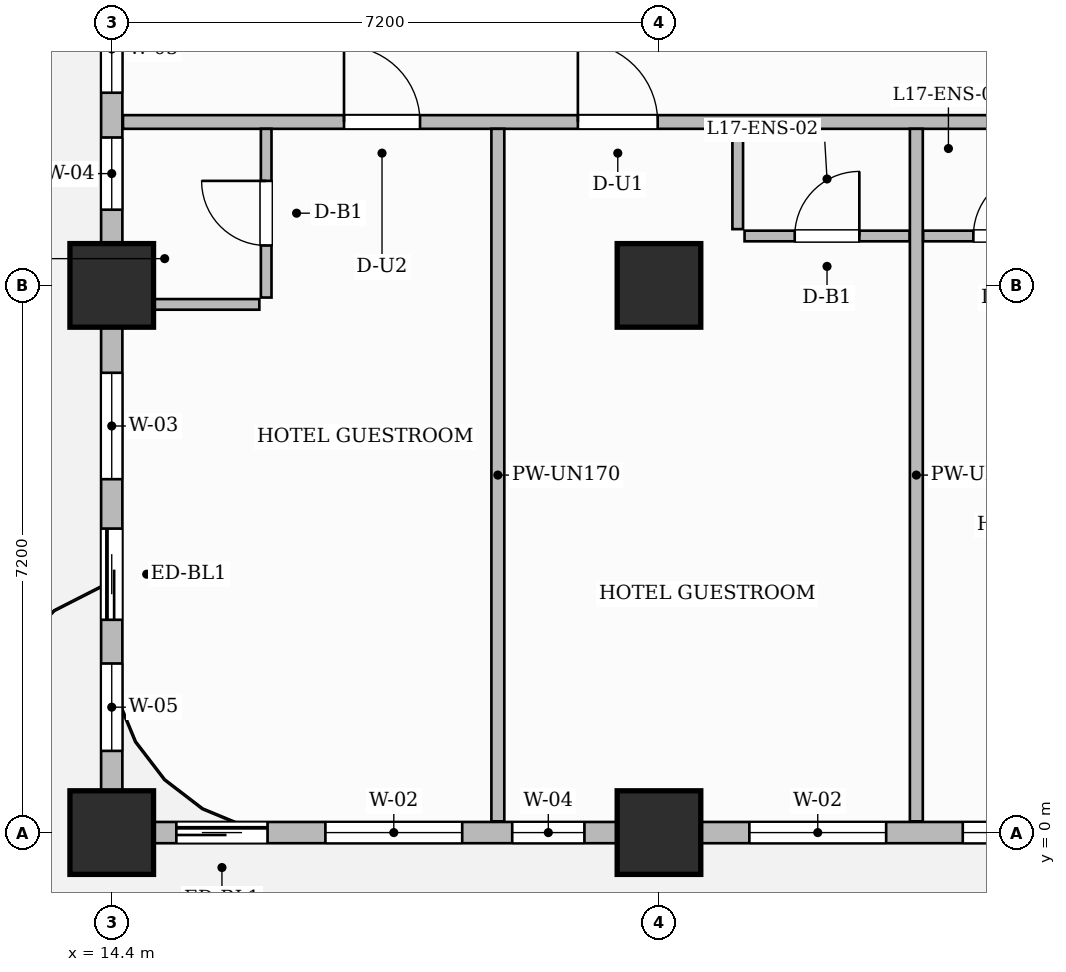
"""IFC4 building model, lengths in metres.
Left out: names, types, materials, properties, quantities, classifications, styles, units other than length and angle.
Written with IfcOpenShell. Run it as: python <this file> out.ifc"""

import sys

from ifc_helpers import new_model, si_unit, direction, frame, frame_2d, origin, origin_2d, place, context, subcontext, project, spatial, rectangle, extrude, source, transform, mapped, element, fill, save


model = new_model("IFC4")
c1 = context("Model", 3, precision=1e-05, world=origin(), true_north=direction((0.0, 1.0)))
c2 = subcontext(c1, "Body", "Model", "MODEL_VIEW")
j1 = project(units=[si_unit("LENGTHUNIT", "METRE"), si_unit("PLANEANGLEUNIT", "RADIAN")], contexts=[c1])
p1 = place(None, origin())
s1 = spatial("IfcSite", under=j1, at=p1, CompositionType="ELEMENT")
p2 = place(p1, origin())
s2 = spatial("IfcBuilding", under=s1, at=p2, CompositionType="ELEMENT")
p3 = place(p2, frame((0.0, 0.0, 73.1)))
s3 = spatial("IfcBuildingStorey", under=s2, at=p3, CompositionType="ELEMENT", Elevation=73.1)
m1 = source(origin(), c2, "Body", "SweptSolid", [
    extrude(rectangle(XDim=1.1, YDim=1.1, at=origin_2d()), origin(), (0.0, 0.0, 1.0), 3.7),
])
for number, where, z_axis, x_axis in (
    (1, (14.4, 0.0, 0.0), (0.0, 0.0, 1.0), (1.0, 0.0, 0.0)),
    (2, (14.4, 7.2, 0.0), (0.0, 0.0, 1.0), (1.0, 0.0, 0.0)),
    (3, (21.6, 0.0, 0.0), (0.0, 0.0, 1.0), (1.0, 0.0, 0.0)),
    (4, (21.6, 7.2, 0.0), (0.0, 0.0, 1.0), (1.0, 0.0, 0.0)),
):
    element("IfcColumn", number, at=place(p3, frame(where, z_axis=z_axis, x_axis=x_axis)), inside=s3, PredefinedType="COLUMN", context=c2, shape_type="MappedRepresentation", body=[
        mapped(m1, transform((0.0, 0.0, 0.0), scale=1.0)),
    ])
p4 = place(p3, frame((14.548, 9.35, 0.0), z_axis=(0.0, 0.0, 1.0), x_axis=(1.0, 0.0, 0.0)))
e5 = element("IfcWall", 5, at=p4, inside=s3, PredefinedType="PARTITIONING", context=c2, shape_type="SweptSolid", body=[
    extrude(rectangle(XDim=15.562, YDim=0.18, at=frame_2d((7.781, 0.0))), origin(), (0.0, 0.0, 1.0), 3.45),
])
p5 = place(p4, frame((2.908, 0.0, 0.0)))
e6 = element("IfcOpeningElement", 6, at=p5, cuts=e5, PredefinedType="OPENING", context=c2, shape_type="SweptSolid", body=[
    extrude(rectangle(XDim=1.0, YDim=2.2, at=frame_2d((0.5, 1.1))), frame((0.0, 0.1, 0.0), z_axis=(0.0, -1.0, 0.0), x_axis=(1.0, 0.0, 0.0)), (0.0, 0.0, 1.0), 0.2),
])
p6 = place(p4, frame((5.985, 0.0, 0.0)))
e7 = element("IfcOpeningElement", 7, at=p6, cuts=e5, PredefinedType="OPENING", context=c2, shape_type="SweptSolid", body=[
    extrude(rectangle(XDim=1.05, YDim=2.25, at=frame_2d((0.525, 1.125))), frame((0.0, 0.1, 0.0), z_axis=(0.0, -1.0, 0.0), x_axis=(1.0, 0.0, 0.0)), (0.0, 0.0, 1.0), 0.2),
])
p7 = place(p4, frame((13.72, 0.0, 0.0)))
e8 = element("IfcOpeningElement", 8, at=p7, cuts=e5, PredefinedType="OPENING", context=c2, shape_type="SweptSolid", body=[
    extrude(rectangle(XDim=1.0, YDim=2.2, at=frame_2d((0.5, 1.1))), frame((0.0, 0.1, 0.0), z_axis=(0.0, -1.0, 0.0), x_axis=(1.0, 0.0, 0.0)), (0.0, 0.0, 1.0), 0.2),
])
p8 = place(p3, frame((19.48, 0.148, 0.0), z_axis=(0.0, 0.0, 1.0), x_axis=(0.0, 1.0, 0.0)))
e9 = element("IfcWall", 9, at=p8, inside=s3, PredefinedType="PARTITIONING", context=c2, shape_type="SweptSolid", body=[
    extrude(rectangle(XDim=9.112, YDim=0.17, at=frame_2d((4.556, 0.0))), origin(), (0.0, 0.0, 1.0), 3.45),
])
p9 = place(p3, frame((24.986, 0.148, 0.0), z_axis=(0.0, 0.0, 1.0), x_axis=(0.0, 1.0, 0.0)))
e10 = element("IfcWall", 10, at=p9, inside=s3, PredefinedType="PARTITIONING", context=c2, shape_type="SweptSolid", body=[
    extrude(rectangle(XDim=9.112, YDim=0.17, at=frame_2d((4.556, 0.0))), origin(), (0.0, 0.0, 1.0), 3.075),
])
p10 = place(p3, frame((16.432, 7.04, 0.0), z_axis=(0.0, 0.0, 1.0), x_axis=(0.0, 1.0, 0.0)))
e11 = element("IfcWall", 11, at=p10, inside=s3, PredefinedType="PARTITIONING", context=c2, shape_type="SweptSolid", body=[
    extrude(rectangle(XDim=2.22, YDim=0.14, at=frame_2d((1.11, 0.0))), origin(), (0.0, 0.0, 1.0), 3.45),
])
p11 = place(p10, frame((0.685, 0.0, 0.0)))
e12 = element("IfcOpeningElement", 12, at=p11, cuts=e11, PredefinedType="OPENING", context=c2, shape_type="SweptSolid", body=[
    extrude(rectangle(XDim=0.85, YDim=2.1, at=frame_2d((0.425, 1.05))), frame((0.0, 0.08, 0.0), z_axis=(0.0, -1.0, 0.0), x_axis=(1.0, 0.0, 0.0)), (0.0, 0.0, 1.0), 0.16),
])
p12 = place(p3, frame((14.49, 6.95, 0.0), z_axis=(0.0, 0.0, 1.0), x_axis=(1.0, 0.0, 0.0)))
e13 = element("IfcWall", 13, at=p12, inside=s3, PredefinedType="PARTITIONING", context=c2, shape_type="SweptSolid", body=[
    extrude(rectangle(XDim=1.852, YDim=0.14, at=frame_2d((0.926, 0.0))), origin(), (0.0, 0.0, 1.0), 2.885),
])
p13 = place(p3, frame((22.636, 7.94, 0.0), z_axis=(0.0, 0.0, 1.0), x_axis=(0.0, 1.0, 0.0)))
e14 = element("IfcWall", 14, at=p13, inside=s3, PredefinedType="PARTITIONING", context=c2, shape_type="SweptSolid", body=[
    extrude(rectangle(XDim=1.32, YDim=0.14, at=frame_2d((0.66, 0.0))), origin(), (0.0, 0.0, 1.0), 3.45),
])
p14 = place(p3, frame((22.726, 7.85, 0.0), z_axis=(0.0, 0.0, 1.0), x_axis=(1.0, 0.0, 0.0)))
e15 = element("IfcWall", 15, at=p14, inside=s3, PredefinedType="PARTITIONING", context=c2, shape_type="SweptSolid", body=[
    extrude(rectangle(XDim=2.17, YDim=0.14, at=frame_2d((1.085, 0.0))), origin(), (0.0, 0.0, 1.0), 3.45),
])
p15 = place(p14, frame((0.66, 0.0, 0.0)))
e16 = element("IfcOpeningElement", 16, at=p15, cuts=e15, PredefinedType="OPENING", context=c2, shape_type="SweptSolid", body=[
    extrude(rectangle(XDim=0.85, YDim=2.1, at=frame_2d((0.425, 1.05))), frame((0.0, 0.08, 0.0), z_axis=(0.0, -1.0, 0.0), x_axis=(1.0, 0.0, 0.0)), (0.0, 0.0, 1.0), 0.16),
])
p16 = place(p3, frame((25.076, 7.85, 0.0), z_axis=(0.0, 0.0, 1.0), x_axis=(1.0, 0.0, 0.0)))
e17 = element("IfcWall", 17, at=p16, inside=s3, PredefinedType="PARTITIONING", context=c2, shape_type="SweptSolid", body=[
    extrude(rectangle(XDim=2.17, YDim=0.14, at=frame_2d((1.085, 0.0))), origin(), (0.0, 0.0, 1.0), 3.45),
])
p17 = place(p16, frame((0.66, 0.0, 0.0)))
e18 = element("IfcOpeningElement", 18, at=p17, cuts=e17, PredefinedType="OPENING", context=c2, shape_type="SweptSolid", body=[
    extrude(rectangle(XDim=0.85, YDim=2.1, at=frame_2d((0.425, 1.05))), frame((0.0, 0.08, 0.0), z_axis=(0.0, -1.0, 0.0), x_axis=(1.0, 0.0, 0.0)), (0.0, 0.0, 1.0), 0.16),
])
p18 = place(p3, frame((14.4, 0.0, 0.0), z_axis=(0.0, 0.0, 1.0), x_axis=(1.0, 0.0, 0.0)))
e19 = element("IfcWall", 19, at=p18, inside=s3, PredefinedType="SOLIDWALL", context=c2, shape_type="SweptSolid", body=[
    extrude(rectangle(XDim=43.2, YDim=0.28, at=frame_2d((21.6, 0.0))), origin(), (0.0, 0.0, 1.0), 2.885),
])
p19 = place(p18, frame((0.85, 0.0, 0.0)))
e20 = element("IfcOpeningElement", 20, at=p19, cuts=e19, PredefinedType="OPENING", context=c2, shape_type="SweptSolid", body=[
    extrude(rectangle(XDim=1.2, YDim=2.2, at=frame_2d((0.6, 1.1))), frame((0.0, 0.15, 0.0), z_axis=(0.0, -1.0, 0.0), x_axis=(1.0, 0.0, 0.0)), (0.0, 0.0, 1.0), 0.3),
])
p20 = place(p18, frame((2.811, 0.0, 0.8)))
e21 = element("IfcOpeningElement", 21, at=p20, cuts=e19, PredefinedType="OPENING", context=c2, shape_type="SweptSolid", body=[
    extrude(rectangle(XDim=1.8, YDim=1.85, at=frame_2d((0.9, 0.925))), frame((0.0, 0.15, 0.0), z_axis=(0.0, -1.0, 0.0), x_axis=(1.0, 0.0, 0.0)), (0.0, 0.0, 1.0), 0.3),
])
p21 = place(p18, frame((5.269, 0.0, 0.8)))
e22 = element("IfcOpeningElement", 22, at=p21, cuts=e19, PredefinedType="OPENING", context=c2, shape_type="SweptSolid", body=[
    extrude(rectangle(XDim=0.95, YDim=1.75, at=frame_2d((0.475, 0.875))), frame((0.0, 0.15, 0.0), z_axis=(0.0, -1.0, 0.0), x_axis=(1.0, 0.0, 0.0)), (0.0, 0.0, 1.0), 0.3),
])
p22 = place(p18, frame((8.389, 0.0, 0.8)))
e23 = element("IfcOpeningElement", 23, at=p22, cuts=e19, PredefinedType="OPENING", context=c2, shape_type="SweptSolid", body=[
    extrude(rectangle(XDim=1.8, YDim=1.85, at=frame_2d((0.9, 0.925))), frame((0.0, 0.15, 0.0), z_axis=(0.0, -1.0, 0.0), x_axis=(1.0, 0.0, 0.0)), (0.0, 0.0, 1.0), 0.3),
])
p23 = place(p18, frame((11.197, 0.0, 0.8)))
e24 = element("IfcOpeningElement", 24, at=p23, cuts=e19, PredefinedType="OPENING", context=c2, shape_type="SweptSolid", body=[
    extrude(rectangle(XDim=1.8, YDim=1.85, at=frame_2d((0.9, 0.925))), frame((0.0, 0.15, 0.0), z_axis=(0.0, -1.0, 0.0), x_axis=(1.0, 0.0, 0.0)), (0.0, 0.0, 1.0), 0.3),
])
p24 = place(p18, frame((16.804, 0.0, 0.8)))
e25 = element("IfcOpeningElement", 25, at=p24, cuts=e19, PredefinedType="OPENING", context=c2, shape_type="SweptSolid", body=[
    extrude(rectangle(XDim=1.8, YDim=1.85, at=frame_2d((0.9, 0.925))), frame((0.0, 0.15, 0.0), z_axis=(0.0, -1.0, 0.0), x_axis=(1.0, 0.0, 0.0)), (0.0, 0.0, 1.0), 0.3),
])
p25 = place(p18, frame((21.521, 0.0, 0.8)))
e26 = element("IfcOpeningElement", 26, at=p25, cuts=e19, PredefinedType="OPENING", context=c2, shape_type="SweptSolid", body=[
    extrude(rectangle(XDim=0.95, YDim=1.75, at=frame_2d((0.475, 0.875))), frame((0.0, 0.15, 0.0), z_axis=(0.0, -1.0, 0.0), x_axis=(1.0, 0.0, 0.0)), (0.0, 0.0, 1.0), 0.3),
])
p26 = place(p18, frame((23.904, 0.0, 0.8)))
e27 = element("IfcOpeningElement", 27, at=p26, cuts=e19, PredefinedType="OPENING", context=c2, shape_type="SweptSolid", body=[
    extrude(rectangle(XDim=1.8, YDim=1.85, at=frame_2d((0.9, 0.925))), frame((0.0, 0.15, 0.0), z_axis=(0.0, -1.0, 0.0), x_axis=(1.0, 0.0, 0.0)), (0.0, 0.0, 1.0), 0.3),
])
p27 = place(p18, frame((29.681, 0.0, 0.8)))
e28 = element("IfcOpeningElement", 28, at=p27, cuts=e19, PredefinedType="OPENING", context=c2, shape_type="SweptSolid", body=[
    extrude(rectangle(XDim=1.8, YDim=1.85, at=frame_2d((0.9, 0.925))), frame((0.0, 0.15, 0.0), z_axis=(0.0, -1.0, 0.0), x_axis=(1.0, 0.0, 0.0)), (0.0, 0.0, 1.0), 0.3),
])
p28 = place(p18, frame((32.327, 0.0, 0.8)))
e29 = element("IfcOpeningElement", 29, at=p28, cuts=e19, PredefinedType="OPENING", context=c2, shape_type="SweptSolid", body=[
    extrude(rectangle(XDim=1.8, YDim=1.85, at=frame_2d((0.9, 0.925))), frame((0.0, 0.15, 0.0), z_axis=(0.0, -1.0, 0.0), x_axis=(1.0, 0.0, 0.0)), (0.0, 0.0, 1.0), 0.3),
])
p29 = place(p18, frame((36.875, 0.0, 0.8)))
e30 = element("IfcOpeningElement", 30, at=p29, cuts=e19, PredefinedType="OPENING", context=c2, shape_type="SweptSolid", body=[
    extrude(rectangle(XDim=1.8, YDim=1.85, at=frame_2d((0.9, 0.925))), frame((0.0, 0.15, 0.0), z_axis=(0.0, -1.0, 0.0), x_axis=(1.0, 0.0, 0.0)), (0.0, 0.0, 1.0), 0.3),
])
p30 = place(p18, frame((39.925, 0.0, 0.8)))
e31 = element("IfcOpeningElement", 31, at=p30, cuts=e19, PredefinedType="OPENING", context=c2, shape_type="SweptSolid", body=[
    extrude(rectangle(XDim=1.8, YDim=1.85, at=frame_2d((0.9, 0.925))), frame((0.0, 0.15, 0.0), z_axis=(0.0, -1.0, 0.0), x_axis=(1.0, 0.0, 0.0)), (0.0, 0.0, 1.0), 0.3),
])
p31 = place(p3, frame((14.4, 0.05, 0.0), z_axis=(0.0, 0.0, 1.0), x_axis=(0.0, 1.0, 0.0)))
e32 = element("IfcWall", 32, at=p31, inside=s3, PredefinedType="SOLIDWALL", context=c2, shape_type="SweptSolid", body=[
    extrude(rectangle(XDim=20.6, YDim=0.28, at=frame_2d((10.3, 0.0))), origin(), (0.0, 0.0, 1.0), 2.885),
])
p32 = place(p31, frame((2.75, 0.0, 0.0)))
e33 = element("IfcOpeningElement", 33, at=p32, cuts=e32, PredefinedType="OPENING", context=c2, shape_type="SweptSolid", body=[
    extrude(rectangle(XDim=1.2, YDim=2.2, at=frame_2d((0.6, 1.1))), frame((0.0, 0.15, 0.0), z_axis=(0.0, -1.0, 0.0), x_axis=(1.0, 0.0, 0.0)), (0.0, 0.0, 1.0), 0.3),
])
p33 = place(p31, frame((1.025, 0.0, 0.8)))
e34 = element("IfcOpeningElement", 34, at=p33, cuts=e32, PredefinedType="OPENING", context=c2, shape_type="SweptSolid", body=[
    extrude(rectangle(XDim=1.15, YDim=1.8, at=frame_2d((0.575, 0.9))), frame((0.0, 0.15, 0.0), z_axis=(0.0, -1.0, 0.0), x_axis=(1.0, 0.0, 0.0)), (0.0, 0.0, 1.0), 0.3),
])
p34 = place(p31, frame((4.6, 0.0, 0.8)))
e35 = element("IfcOpeningElement", 35, at=p34, cuts=e32, PredefinedType="OPENING", context=c2, shape_type="SweptSolid", body=[
    extrude(rectangle(XDim=1.4, YDim=1.85, at=frame_2d((0.7, 0.925))), frame((0.0, 0.15, 0.0), z_axis=(0.0, -1.0, 0.0), x_axis=(1.0, 0.0, 0.0)), (0.0, 0.0, 1.0), 0.3),
])
p35 = place(p31, frame((8.146, 0.0, 0.8)))
e36 = element("IfcOpeningElement", 36, at=p35, cuts=e32, PredefinedType="OPENING", context=c2, shape_type="SweptSolid", body=[
    extrude(rectangle(XDim=0.95, YDim=1.75, at=frame_2d((0.475, 0.875))), frame((0.0, 0.15, 0.0), z_axis=(0.0, -1.0, 0.0), x_axis=(1.0, 0.0, 0.0)), (0.0, 0.0, 1.0), 0.3),
])
p36 = place(p31, frame((9.685, 0.0, 0.8)))
e37 = element("IfcOpeningElement", 37, at=p36, cuts=e32, PredefinedType="OPENING", context=c2, shape_type="SweptSolid", body=[
    extrude(rectangle(XDim=1.15, YDim=1.8, at=frame_2d((0.575, 0.9))), frame((0.0, 0.15, 0.0), z_axis=(0.0, -1.0, 0.0), x_axis=(1.0, 0.0, 0.0)), (0.0, 0.0, 1.0), 0.3),
])
p37 = place(p31, frame((11.689, 0.0, 0.8)))
e38 = element("IfcOpeningElement", 38, at=p37, cuts=e32, PredefinedType="OPENING", context=c2, shape_type="SweptSolid", body=[
    extrude(rectangle(XDim=1.4, YDim=1.85, at=frame_2d((0.7, 0.925))), frame((0.0, 0.15, 0.0), z_axis=(0.0, -1.0, 0.0), x_axis=(1.0, 0.0, 0.0)), (0.0, 0.0, 1.0), 0.3),
])
p38 = place(p31, frame((16.79, 0.0, 0.8)))
e39 = element("IfcOpeningElement", 39, at=p38, cuts=e32, PredefinedType="OPENING", context=c2, shape_type="SweptSolid", body=[
    extrude(rectangle(XDim=1.8, YDim=1.85, at=frame_2d((0.9, 0.925))), frame((0.0, 0.15, 0.0), z_axis=(0.0, -1.0, 0.0), x_axis=(1.0, 0.0, 0.0)), (0.0, 0.0, 1.0), 0.3),
])
m2 = source(origin(), c2, "Body", "SweptSolid", [
    extrude(rectangle(XDim=0.85, YDim=2.1, at=frame_2d((0.425, 1.05))), frame((0.0, 0.025, 0.0), z_axis=(0.0, -1.0, 0.0), x_axis=(1.0, 0.0, 0.0)), (0.0, 0.0, 1.0), 0.05),
])
p39 = place(p11, origin())
e40 = element("IfcDoor", 40, at=p39, inside=s3, OperationType="SINGLE_SWING_RIGHT", PredefinedType="DOOR", context=c2, shape_type="MappedRepresentation", body=[
    mapped(m2, transform((0.0, 0.0, 0.0), scale=1.0)),
])
fill(e12, e40)
m3 = source(origin(), c2, "Body", "SweptSolid", [
    extrude(rectangle(XDim=1.0, YDim=2.2, at=frame_2d((0.5, 1.1))), frame((0.0, 0.025, 0.0), z_axis=(0.0, -1.0, 0.0), x_axis=(1.0, 0.0, 0.0)), (0.0, 0.0, 1.0), 0.05),
])
p40 = place(p5, origin())
e41 = element("IfcDoor", 41, at=p40, inside=s3, OperationType="SINGLE_SWING_LEFT", PredefinedType="DOOR", context=c2, shape_type="MappedRepresentation", body=[
    mapped(m3, transform((0.0, 0.0, 0.0), scale=1.0)),
])
fill(e6, e41)
p41 = place(p15, origin())
e42 = element("IfcDoor", 42, at=p41, inside=s3, OperationType="SINGLE_SWING_RIGHT", PredefinedType="DOOR", context=c2, shape_type="MappedRepresentation", body=[
    mapped(m2, transform((0.0, 0.0, 0.0), scale=1.0)),
])
fill(e16, e42)
m4 = source(origin(), c2, "Body", "SweptSolid", [
    extrude(rectangle(XDim=1.05, YDim=2.25, at=frame_2d((0.525, 1.125))), frame((0.0, 0.025, 0.0), z_axis=(0.0, -1.0, 0.0), x_axis=(1.0, 0.0, 0.0)), (0.0, 0.0, 1.0), 0.05),
])
p42 = place(p6, origin())
e43 = element("IfcDoor", 43, at=p42, inside=s3, OperationType="SINGLE_SWING_LEFT", PredefinedType="DOOR", context=c2, shape_type="MappedRepresentation", body=[
    mapped(m4, transform((0.0, 0.0, 0.0), scale=1.0)),
])
fill(e7, e43)
p43 = place(p17, origin())
e44 = element("IfcDoor", 44, at=p43, inside=s3, OperationType="SINGLE_SWING_RIGHT", PredefinedType="DOOR", context=c2, shape_type="MappedRepresentation", body=[
    mapped(m2, transform((0.0, 0.0, 0.0), scale=1.0)),
])
fill(e18, e44)
m5 = source(origin(), c2, "Body", "SweptSolid", [
    extrude(rectangle(XDim=1.2, YDim=2.2, at=frame_2d((0.6, 1.1))), frame((0.0, 0.025, 0.0), z_axis=(0.0, -1.0, 0.0), x_axis=(1.0, 0.0, 0.0)), (0.0, 0.0, 1.0), 0.05),
])
p44 = place(p19, origin())
e45 = element("IfcDoor", 45, at=p44, inside=s3, OperationType="SLIDING_TO_LEFT", PredefinedType="DOOR", context=c2, shape_type="MappedRepresentation", body=[
    mapped(m5, transform((0.0, 0.0, 0.0), scale=1.0)),
])
fill(e20, e45)
p45 = place(p32, origin())
e46 = element("IfcDoor", 46, at=p45, inside=s3, OperationType="SLIDING_TO_LEFT", PredefinedType="DOOR", context=c2, shape_type="MappedRepresentation", body=[
    mapped(m5, transform((0.0, 0.0, 0.0), scale=1.0)),
])
fill(e33, e46)
m6 = source(origin(), c2, "Body", "SweptSolid", [
    extrude(rectangle(XDim=1.8, YDim=1.85, at=frame_2d((0.9, 0.925))), frame((0.0, 0.03, 0.0), z_axis=(0.0, -1.0, 0.0), x_axis=(1.0, 0.0, 0.0)), (0.0, 0.0, 1.0), 0.06),
])
p46 = place(p20, origin())
e47 = element("IfcWindow", 47, at=p46, inside=s3, PartitioningType="DOUBLE_PANEL_VERTICAL", PredefinedType="WINDOW", context=c2, shape_type="MappedRepresentation", body=[
    mapped(m6, transform((0.0, 0.0, 0.0), scale=1.0)),
])
fill(e21, e47)
m7 = source(origin(), c2, "Body", "SweptSolid", [
    extrude(rectangle(XDim=0.95, YDim=1.75, at=frame_2d((0.475, 0.875))), frame((0.0, 0.03, 0.0), z_axis=(0.0, -1.0, 0.0), x_axis=(1.0, 0.0, 0.0)), (0.0, 0.0, 1.0), 0.06),
])
p47 = place(p21, origin())
e48 = element("IfcWindow", 48, at=p47, inside=s3, PartitioningType="SINGLE_PANEL", PredefinedType="WINDOW", context=c2, shape_type="MappedRepresentation", body=[
    mapped(m7, transform((0.0, 0.0, 0.0), scale=1.0)),
])
fill(e22, e48)
p48 = place(p22, origin())
e49 = element("IfcWindow", 49, at=p48, inside=s3, PartitioningType="DOUBLE_PANEL_VERTICAL", PredefinedType="WINDOW", context=c2, shape_type="MappedRepresentation", body=[
    mapped(m6, transform((0.0, 0.0, 0.0), scale=1.0)),
])
fill(e23, e49)
p49 = place(p23, origin())
e50 = element("IfcWindow", 50, at=p49, inside=s3, PartitioningType="DOUBLE_PANEL_VERTICAL", PredefinedType="WINDOW", context=c2, shape_type="MappedRepresentation", body=[
    mapped(m6, transform((0.0, 0.0, 0.0), scale=1.0)),
])
fill(e24, e50)
m8 = source(origin(), c2, "Body", "SweptSolid", [
    extrude(rectangle(XDim=1.15, YDim=1.8, at=frame_2d((0.575, 0.9))), frame((0.0, 0.03, 0.0), z_axis=(0.0, -1.0, 0.0), x_axis=(1.0, 0.0, 0.0)), (0.0, 0.0, 1.0), 0.06),
])
p50 = place(p33, origin())
e51 = element("IfcWindow", 51, at=p50, inside=s3, PartitioningType="SINGLE_PANEL", PredefinedType="WINDOW", context=c2, shape_type="MappedRepresentation", body=[
    mapped(m8, transform((0.0, 0.0, 0.0), scale=1.0)),
])
fill(e34, e51)
m9 = source(origin(), c2, "Body", "SweptSolid", [
    extrude(rectangle(XDim=1.4, YDim=1.85, at=frame_2d((0.7, 0.925))), frame((0.0, 0.03, 0.0), z_axis=(0.0, -1.0, 0.0), x_axis=(1.0, 0.0, 0.0)), (0.0, 0.0, 1.0), 0.06),
])
p51 = place(p34, origin())
e52 = element("IfcWindow", 52, at=p51, inside=s3, PartitioningType="SINGLE_PANEL", PredefinedType="WINDOW", context=c2, shape_type="MappedRepresentation", body=[
    mapped(m9, transform((0.0, 0.0, 0.0), scale=1.0)),
])
fill(e35, e52)
p52 = place(p35, origin())
e53 = element("IfcWindow", 53, at=p52, inside=s3, PartitioningType="SINGLE_PANEL", PredefinedType="WINDOW", context=c2, shape_type="MappedRepresentation", body=[
    mapped(m7, transform((0.0, 0.0, 0.0), scale=1.0)),
])
fill(e36, e53)
p53 = place(p36, origin())
e54 = element("IfcWindow", 54, at=p53, inside=s3, PartitioningType="SINGLE_PANEL", PredefinedType="WINDOW", context=c2, shape_type="MappedRepresentation", body=[
    mapped(m8, transform((0.0, 0.0, 0.0), scale=1.0)),
])
fill(e37, e54)
save(model, sys.argv[1])
